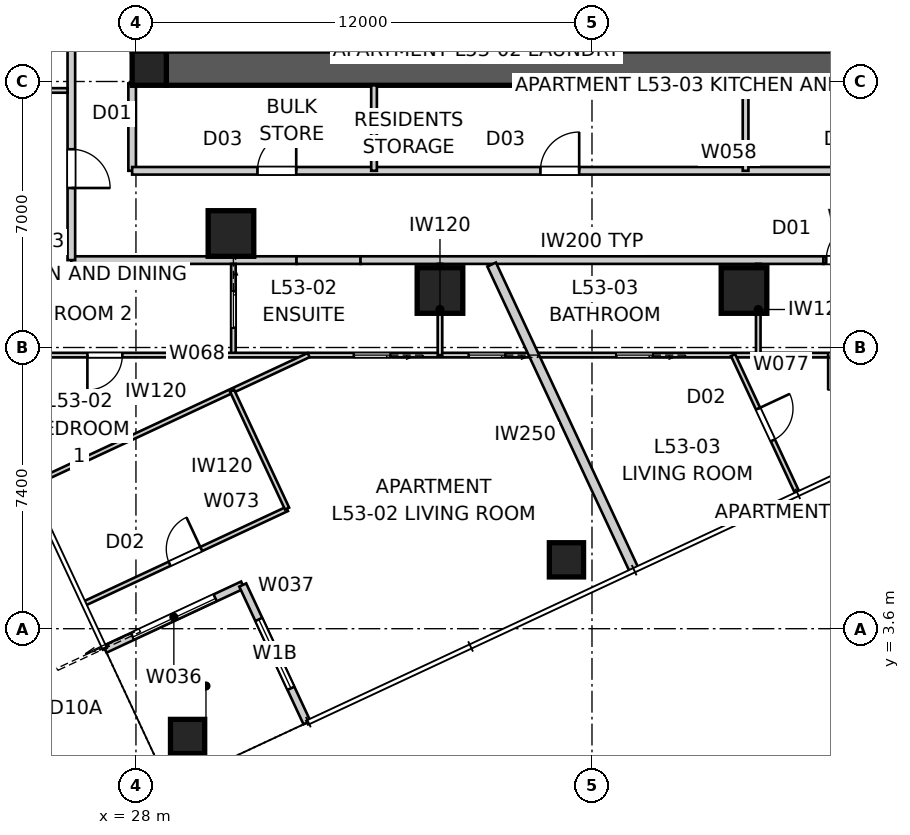
"""IFC4 building model, lengths in metres.
Left out: names, types, materials, properties, quantities, classifications, styles, units other than length and angle.
Written with IfcOpenShell. Run it as: python <this file> out.ifc"""

import sys

from ifc_helpers import new_model, si_unit, direction, frame, frame_2d, origin, origin_2d, place, context, subcontext, project, spatial, polyline, rectangle, outline, extrude, element, fill, save


model = new_model("IFC4")
c1 = context("Model", 3, precision=1e-05, world=origin(), true_north=direction((0.0, 1.0)))
c2 = subcontext(c1, "Body", "Model", "MODEL_VIEW")
j1 = project(units=[si_unit("LENGTHUNIT", "METRE"), si_unit("PLANEANGLEUNIT", "RADIAN")], contexts=[c1])
p1 = place(None, origin())
s1 = spatial("IfcSite", under=j1, at=p1, CompositionType="ELEMENT")
p2 = place(p1, origin())
s2 = spatial("IfcBuilding", under=s1, at=p2, CompositionType="ELEMENT")
p3 = place(p2, frame((0.0, 0.0, 193.0)))
s3 = spatial("IfcBuildingStorey", under=s2, at=p3, CompositionType="ELEMENT", Elevation=193.0)
p4 = place(p3, frame((51.2, 18.35, 0.0), z_axis=(0.0, 0.0, 1.0), x_axis=(-1.0, 0.0, 0.0)))
e1 = element("IfcWall", 1, at=p4, inside=s3, PredefinedType="SHEAR", context=c2, shape_type="SweptSolid", body=[
    extrude(outline(polyline([(0.0, -0.45), (22.4, -0.45), (22.4, -0.025), (22.85, -0.025), (22.85, 0.025), (22.4, 0.025), (22.4, 0.45), (0.0, 0.45), (0.0, 0.025), (-0.45, 0.025), (-0.45, -0.025), (0.0, -0.025), (0.0, -0.45)])), origin(), (0.0, 0.0, 1.0), 3.4),
])
p5 = place(p3, frame((28.35, 41.2, 0.0), z_axis=(0.0, 0.0, 1.0), x_axis=(0.0, -1.0, 0.0)))
e2 = element("IfcWall", 2, at=p5, inside=s3, PredefinedType="SHEAR", context=c2, shape_type="SweptSolid", body=[
    extrude(outline(polyline([(0.0, -0.45), (22.4, -0.45), (22.4, -0.025), (22.85, -0.025), (22.85, 0.025), (22.4, 0.025), (22.4, 0.45), (0.0, 0.45), (0.0, 0.025), (-0.45, 0.025), (-0.45, -0.025), (0.0, -0.025), (0.0, -0.45)])), origin(), (0.0, 0.0, 1.0), 3.4),
])
p6 = place(p5, frame((11.14, 0.0, 0.0)))
e3 = element("IfcOpeningElement", 3, at=p6, cuts=e2, PredefinedType="OPENING", context=c2, shape_type="SweptSolid", body=[
    extrude(rectangle(XDim=1.02, YDim=2.4, at=frame_2d((0.51, 1.2))), frame((0.0, 0.46, 0.0), z_axis=(0.0, -1.0, 0.0), x_axis=(1.0, 0.0, 0.0)), (0.0, 0.0, 1.0), 0.92),
])
for number, where, z_axis, x_axis in (
    (4, (28.35, 18.35, 0.0), (0.0, 0.0, 1.0), (1.0, 0.0, 0.0)),
    (5, (29.359, 0.764, 0.0), (0.0, 0.0, 1.0), (1.0, 0.0, 0.0)),
    (6, (39.328, 5.412, 0.0), (0.0, 0.0, 1.0), (1.0, 0.0, 0.0)),
):
    element("IfcColumn", number, at=place(p3, frame(where, z_axis=z_axis, x_axis=x_axis)), inside=s3, PredefinedType="COLUMN", context=c2, shape_type="SweptSolid", body=[
        extrude(rectangle(XDim=0.9, YDim=0.9, at=origin_2d()), origin(), (0.0, 0.0, 1.0), 3.4),
    ])
for number, where, z_axis, x_axis in (
    (7, (30.5, 14.0, 0.0), (0.0, 0.0, 1.0), (1.0, 0.0, 0.0)),
    (8, (36.0, 12.5, 0.0), (0.0, 0.0, 1.0), (1.0, 0.0, 0.0)),
    (9, (44.0, 12.5, 0.0), (0.0, 0.0, 1.0), (1.0, 0.0, 0.0)),
):
    element("IfcColumn", number, at=place(p3, frame(where, z_axis=z_axis, x_axis=x_axis)), inside=s3, PredefinedType="COLUMN", context=c2, shape_type="SweptSolid", body=[
        extrude(rectangle(XDim=1.2, YDim=1.2, at=origin_2d()), origin(), (0.0, 0.0, 1.0), 3.4),
    ])
p7 = place(p3, frame((27.185, 3.06, 0.0), z_axis=(0.0, 0.0, 1.0), x_axis=(0.906289140828, 0.422658246362, 0.0)))
e10 = element("IfcWall", 10, at=p7, inside=s3, PredefinedType="SOLIDWALL", context=c2, shape_type="SweptSolid", body=[
    extrude(rectangle(XDim=4.0, YDim=0.2, at=frame_2d((2.0, 0.0))), origin(), (0.0, 0.0, 1.0), 3.25),
])
p8 = place(p7, frame((0.8, 0.0, 0.0)))
e11 = element("IfcOpeningElement", 11, at=p8, cuts=e10, PredefinedType="OPENING", context=c2, shape_type="SweptSolid", body=[
    extrude(rectangle(XDim=2.4, YDim=2.1, at=frame_2d((1.2, 1.05))), frame((0.0, 0.11, 0.0), z_axis=(0.0, -1.0, 0.0), x_axis=(1.0, 0.0, 0.0)), (0.0, 0.0, 1.0), 0.22),
])
p9 = place(p3, frame((30.81, 4.75, 0.0), z_axis=(0.0, 0.0, 1.0), x_axis=(0.422658246362, -0.906289140828, 0.0)))
e12 = element("IfcWall", 12, at=p9, inside=s3, PredefinedType="SOLIDWALL", context=c2, shape_type="SweptSolid", body=[
    extrude(rectangle(XDim=4.0, YDim=0.2, at=frame_2d((2.0, 0.0))), origin(), (0.0, 0.0, 1.0), 3.25),
])
p10 = place(p9, frame((1.0, 0.0, 0.45)))
e13 = element("IfcOpeningElement", 13, at=p10, cuts=e12, PredefinedType="OPENING", context=c2, shape_type="SweptSolid", body=[
    extrude(rectangle(XDim=2.0, YDim=1.8, at=frame_2d((1.0, 0.9))), frame((0.0, 0.11, 0.0), z_axis=(0.0, -1.0, 0.0), x_axis=(1.0, 0.0, 0.0)), (0.0, 0.0, 1.0), 0.22),
])
p11 = place(p3, frame((26.3, 13.3, 0.0), z_axis=(0.0, 0.0, 1.0), x_axis=(1.0, 0.0, 0.0)))
e14 = element("IfcWall", 14, at=p11, inside=s3, PredefinedType="PARTITIONING", context=c2, shape_type="SweptSolid", body=[
    extrude(rectangle(XDim=5.925, YDim=0.2, at=frame_2d((2.962, 0.0))), origin(), (0.0, 0.0, 1.0), 3.25),
])
p12 = place(p3, frame((32.225, 13.3, 0.0), z_axis=(0.0, 0.0, 1.0), x_axis=(1.0, 0.0, 0.0)))
e15 = element("IfcWall", 15, at=p12, inside=s3, PredefinedType="PARTITIONING", context=c2, shape_type="SweptSolid", body=[
    extrude(rectangle(XDim=1.684, YDim=0.2, at=frame_2d((0.842, 0.0))), origin(), (0.0, 0.0, 1.0), 2.55),
])
p13 = place(p3, frame((33.908, 13.3, 0.0), z_axis=(0.0, 0.0, 1.0), x_axis=(1.0, 0.0, 0.0)))
e16 = element("IfcWall", 16, at=p13, inside=s3, PredefinedType="PARTITIONING", context=c2, shape_type="SweptSolid", body=[
    extrude(rectangle(XDim=12.183, YDim=0.2, at=frame_2d((6.092, 0.0))), origin(), (0.0, 0.0, 1.0), 3.25),
])
p14 = place(p3, frame((46.092, 13.3, 0.0), z_axis=(0.0, 0.0, 1.0), x_axis=(1.0, 0.0, 0.0)))
e17 = element("IfcWall", 17, at=p14, inside=s3, PredefinedType="PARTITIONING", context=c2, shape_type="SweptSolid", body=[
    extrude(rectangle(XDim=1.684, YDim=0.2, at=frame_2d((0.842, 0.0))), origin(), (0.0, 0.0, 1.0), 2.55),
])
p15 = place(p14, frame((0.073, 0.0, 0.0)))
e18 = element("IfcOpeningElement", 18, at=p15, cuts=e17, PredefinedType="OPENING", context=c2, shape_type="SweptSolid", body=[
    extrude(rectangle(XDim=1.02, YDim=2.34, at=frame_2d((0.51, 1.17))), frame((0.0, 0.11, 0.0), z_axis=(0.0, -1.0, 0.0), x_axis=(1.0, 0.0, 0.0)), (0.0, 0.0, 1.0), 0.22),
])
p16 = place(p3, frame((26.3, 47.1, 0.0), z_axis=(0.0, 0.0, 1.0), x_axis=(0.0, -1.0, 0.0)))
e19 = element("IfcWall", 19, at=p16, inside=s3, PredefinedType="PARTITIONING", context=c2, shape_type="SweptSolid", body=[
    extrude(rectangle(XDim=33.8, YDim=0.2, at=frame_2d((16.9, 0.0))), origin(), (0.0, 0.0, 1.0), 3.25),
])
p17 = place(p16, frame((15.449, 0.0, 0.0)))
e20 = element("IfcOpeningElement", 20, at=p17, cuts=e19, PredefinedType="OPENING", context=c2, shape_type="SweptSolid", body=[
    extrude(rectangle(XDim=1.02, YDim=2.34, at=frame_2d((0.51, 1.17))), frame((0.0, 0.11, 0.0), z_axis=(0.0, -1.0, 0.0), x_axis=(1.0, 0.0, 0.0)), (0.0, 0.0, 1.0), 0.22),
])
p18 = place(p16, frame((30.883, 0.0, 0.0)))
e21 = element("IfcOpeningElement", 21, at=p18, cuts=e19, PredefinedType="OPENING", context=c2, shape_type="SweptSolid", body=[
    extrude(rectangle(XDim=1.02, YDim=2.34, at=frame_2d((0.51, 1.17))), frame((0.0, 0.11, 0.0), z_axis=(0.0, -1.0, 0.0), x_axis=(1.0, 0.0, 0.0)), (0.0, 0.0, 1.0), 0.22),
])
p19 = place(p3, frame((41.11, 5.14, 0.0), z_axis=(0.0, 0.0, 1.0), x_axis=(-0.42262942879, 0.906302579672, 0.0)))
e22 = element("IfcWall", 22, at=p19, inside=s3, PredefinedType="PARTITIONING", context=c2, shape_type="SweptSolid", body=[
    extrude(rectangle(XDim=8.875, YDim=0.25, at=frame_2d((4.438, 0.0))), origin(), (0.0, 0.0, 1.0), 3.25),
])
p20 = place(p3, frame((27.9, 17.95, 0.0), z_axis=(0.0, 0.0, 1.0), x_axis=(0.0, -1.0, 0.0)))
e23 = element("IfcWall", 23, at=p20, inside=s3, PredefinedType="PARTITIONING", context=c2, shape_type="SweptSolid", body=[
    extrude(rectangle(XDim=2.3, YDim=0.2, at=frame_2d((1.15, 0.0))), origin(), (0.0, 0.0, 1.0), 3.25),
])
p21 = place(p3, frame((27.9, 15.65, 0.0), z_axis=(0.0, 0.0, 1.0), x_axis=(1.0, 0.0, 0.0)))
e24 = element("IfcWall", 24, at=p21, inside=s3, PredefinedType="PARTITIONING", context=c2, shape_type="SweptSolid", body=[
    extrude(rectangle(XDim=24.2, YDim=0.2, at=frame_2d((12.1, 0.0))), origin(), (0.0, 0.0, 1.0), 3.25),
])
p22 = place(p21, frame((10.743, 0.0, 0.0)))
e25 = element("IfcOpeningElement", 25, at=p22, cuts=e24, PredefinedType="OPENING", context=c2, shape_type="SweptSolid", body=[
    extrude(rectangle(XDim=1.02, YDim=2.1, at=frame_2d((0.51, 1.05))), frame((0.0, 0.11, 0.0), z_axis=(0.0, -1.0, 0.0), x_axis=(1.0, 0.0, 0.0)), (0.0, 0.0, 1.0), 0.22),
])
p23 = place(p21, frame((19.636, 0.0, 0.0)))
e26 = element("IfcOpeningElement", 26, at=p23, cuts=e24, PredefinedType="OPENING", context=c2, shape_type="SweptSolid", body=[
    extrude(rectangle(XDim=1.02, YDim=2.1, at=frame_2d((0.51, 1.05))), frame((0.0, 0.11, 0.0), z_axis=(0.0, -1.0, 0.0), x_axis=(1.0, 0.0, 0.0)), (0.0, 0.0, 1.0), 0.22),
])
p24 = place(p21, frame((3.297, 0.0, 0.0)))
e27 = element("IfcOpeningElement", 27, at=p24, cuts=e24, PredefinedType="OPENING", context=c2, shape_type="SweptSolid", body=[
    extrude(rectangle(XDim=1.02, YDim=2.1, at=frame_2d((0.51, 1.05))), frame((0.0, 0.11, 0.0), z_axis=(0.0, -1.0, 0.0), x_axis=(1.0, 0.0, 0.0)), (0.0, 0.0, 1.0), 0.22),
])
p25 = place(p3, frame((34.265, 15.65, 0.0), z_axis=(0.0, 0.0, 1.0), x_axis=(0.0, 1.0, 0.0)))
e28 = element("IfcWall", 28, at=p25, inside=s3, PredefinedType="SOLIDWALL", context=c2, shape_type="SweptSolid", body=[
    extrude(rectangle(XDim=2.25, YDim=0.15, at=frame_2d((1.125, 0.0))), origin(), (0.0, 0.0, 1.0), 2.796),
])
p26 = place(p3, frame((44.042, 15.65, 0.0), z_axis=(0.0, 0.0, 1.0), x_axis=(0.0, 1.0, 0.0)))
e29 = element("IfcWall", 29, at=p26, inside=s3, PredefinedType="SOLIDWALL", context=c2, shape_type="SweptSolid", body=[
    extrude(rectangle(XDim=2.25, YDim=0.15, at=frame_2d((1.125, 0.0))), origin(), (0.0, 0.0, 1.0), 3.25),
])
p27 = place(p3, frame((23.8, 17.765, 0.0), z_axis=(0.0, 0.0, 1.0), x_axis=(1.0, 0.0, 0.0)))
e30 = element("IfcWall", 30, at=p27, inside=s3, PredefinedType="PARTITIONING", context=c2, shape_type="SweptSolid", body=[
    extrude(rectangle(XDim=2.4, YDim=0.12, at=frame_2d((1.2, 0.0))), origin(), (0.0, 0.0, 1.0), 3.25),
])
p28 = place(p27, frame((0.72, 0.0, 0.0)))
e31 = element("IfcOpeningElement", 31, at=p28, cuts=e30, PredefinedType="OPENING", context=c2, shape_type="SweptSolid", body=[
    extrude(rectangle(XDim=0.96, YDim=2.1, at=frame_2d((0.48, 1.05))), frame((0.0, 0.07, 0.0), z_axis=(0.0, -1.0, 0.0), x_axis=(1.0, 0.0, 0.0)), (0.0, 0.0, 1.0), 0.14),
])
p29 = place(p3, frame((30.564, 13.2, 0.0), z_axis=(0.0, 0.0, 1.0), x_axis=(0.0, -1.0, 0.0)))
e32 = element("IfcWall", 32, at=p29, inside=s3, PredefinedType="PARTITIONING", context=c2, shape_type="SweptSolid", body=[
    extrude(rectangle(XDim=2.4, YDim=0.12, at=frame_2d((1.2, 0.0))), origin(), (0.0, 0.0, 1.0), 3.25),
])
p30 = place(p29, frame((0.72, 0.0, 0.0)))
e33 = element("IfcOpeningElement", 33, at=p30, cuts=e32, PredefinedType="OPENING", context=c2, shape_type="SweptSolid", body=[
    extrude(rectangle(XDim=0.96, YDim=2.1, at=frame_2d((0.48, 1.05))), frame((0.0, 0.07, 0.0), z_axis=(0.0, -1.0, 0.0), x_axis=(1.0, 0.0, 0.0)), (0.0, 0.0, 1.0), 0.14),
])
p31 = place(p3, frame((53.208, 10.8, 0.0), z_axis=(0.0, 0.0, 1.0), x_axis=(-1.0, 0.0, 0.0)))
e34 = element("IfcWall", 34, at=p31, inside=s3, PredefinedType="PARTITIONING", context=c2, shape_type="SweptSolid", body=[
    extrude(rectangle(XDim=29.593, YDim=0.12, at=frame_2d((14.796, 0.0))), origin(), (0.0, 0.0, 1.0), 3.25),
])
p32 = place(p31, frame((6.074, 0.0, 0.0)))
e35 = element("IfcOpeningElement", 35, at=p32, cuts=e34, PredefinedType="OPENING", context=c2, shape_type="SweptSolid", body=[
    extrude(rectangle(XDim=0.92, YDim=2.34, at=frame_2d((0.46, 1.17))), frame((0.0, 0.07, 0.0), z_axis=(0.0, -1.0, 0.0), x_axis=(1.0, 0.0, 0.0)), (0.0, 0.0, 1.0), 0.14),
])
p33 = place(p31, frame((25.566, 0.0, 0.0)))
e36 = element("IfcOpeningElement", 36, at=p33, cuts=e34, PredefinedType="OPENING", context=c2, shape_type="SweptSolid", body=[
    extrude(rectangle(XDim=0.92, YDim=2.34, at=frame_2d((0.46, 1.17))), frame((0.0, 0.07, 0.0), z_axis=(0.0, -1.0, 0.0), x_axis=(1.0, 0.0, 0.0)), (0.0, 0.0, 1.0), 0.14),
])
p34 = place(p31, frame((18.515, 0.0, 0.0)))
e37 = element("IfcOpeningElement", 37, at=p34, cuts=e34, PredefinedType="OPENING", context=c2, shape_type="SweptSolid", body=[
    extrude(rectangle(XDim=0.96, YDim=2.1, at=frame_2d((0.48, 1.05))), frame((0.0, 0.07, 0.0), z_axis=(0.0, -1.0, 0.0), x_axis=(1.0, 0.0, 0.0)), (0.0, 0.0, 1.0), 0.14),
])
p35 = place(p31, frame((15.493, 0.0, 0.0)))
e38 = element("IfcOpeningElement", 38, at=p35, cuts=e34, PredefinedType="OPENING", context=c2, shape_type="SweptSolid", body=[
    extrude(rectangle(XDim=0.96, YDim=2.1, at=frame_2d((0.48, 1.05))), frame((0.0, 0.07, 0.0), z_axis=(0.0, -1.0, 0.0), x_axis=(1.0, 0.0, 0.0)), (0.0, 0.0, 1.0), 0.14),
])
p36 = place(p31, frame((11.609, 0.0, 0.0)))
e39 = element("IfcOpeningElement", 39, at=p36, cuts=e34, PredefinedType="OPENING", context=c2, shape_type="SweptSolid", body=[
    extrude(rectangle(XDim=0.96, YDim=2.1, at=frame_2d((0.48, 1.05))), frame((0.0, 0.07, 0.0), z_axis=(0.0, -1.0, 0.0), x_axis=(1.0, 0.0, 0.0)), (0.0, 0.0, 1.0), 0.14),
])
p37 = place(p3, frame((36.0, 13.2, 0.0), z_axis=(0.0, 0.0, 1.0), x_axis=(0.0, -1.0, 0.0)))
e40 = element("IfcWall", 40, at=p37, inside=s3, PredefinedType="PARTITIONING", context=c2, shape_type="SweptSolid", body=[
    extrude(rectangle(XDim=2.4, YDim=0.12, at=frame_2d((1.2, 0.0))), origin(), (0.0, 0.0, 1.0), 3.25),
])
p38 = place(p3, frame((25.213, 7.382, 0.0), z_axis=(0.0, 0.0, 1.0), x_axis=(0.906311876708, 0.422609491301, 0.0)))
e41 = element("IfcWall", 41, at=p38, inside=s3, PredefinedType="PARTITIONING", context=c2, shape_type="SweptSolid", body=[
    extrude(rectangle(XDim=8.088, YDim=0.12, at=frame_2d((4.044, 0.0))), origin(), (0.0, 0.0, 1.0), 3.25),
])
p39 = place(p3, frame((26.663, 4.273, 0.0), z_axis=(0.0, 0.0, 1.0), x_axis=(0.906259747144, 0.42272126834, 0.0)))
e42 = element("IfcWall", 42, at=p39, inside=s3, PredefinedType="PARTITIONING", context=c2, shape_type="SweptSolid", body=[
    extrude(rectangle(XDim=5.861, YDim=0.12, at=frame_2d((2.93, 0.0))), origin(), (0.0, 0.0, 1.0), 3.25),
])
p40 = place(p39, frame((2.45, 0.0, 0.0)))
e43 = element("IfcOpeningElement", 43, at=p40, cuts=e42, PredefinedType="OPENING", context=c2, shape_type="SweptSolid", body=[
    extrude(rectangle(XDim=0.92, YDim=2.34, at=frame_2d((0.46, 1.17))), frame((0.0, 0.07, 0.0), z_axis=(0.0, -1.0, 0.0), x_axis=(1.0, 0.0, 0.0)), (0.0, 0.0, 1.0), 0.14),
])
p41 = place(p3, frame((31.976, 6.761, 0.0), z_axis=(0.0, 0.0, 1.0), x_axis=(-0.422608022988, 0.906312561375, 0.0)))
e44 = element("IfcWall", 44, at=p41, inside=s3, PredefinedType="PARTITIONING", context=c2, shape_type="SweptSolid", body=[
    extrude(rectangle(XDim=3.421, YDim=0.12, at=frame_2d((1.71, 0.0))), origin(), (0.0, 0.0, 1.0), 3.25),
])
p42 = place(p3, frame((44.375, 10.8, 0.0), z_axis=(0.0, 0.0, 1.0), x_axis=(0.0, 1.0, 0.0)))
e45 = element("IfcWall", 45, at=p42, inside=s3, PredefinedType="PARTITIONING", context=c2, shape_type="SweptSolid", body=[
    extrude(rectangle(XDim=2.4, YDim=0.12, at=frame_2d((1.2, 0.0))), origin(), (0.0, 0.0, 1.0), 3.25),
])
p43 = place(p3, frame((43.712, 10.8, 0.0), z_axis=(0.0, 0.0, 1.0), x_axis=(0.422620823304, -0.906306592556, 0.0)))
e46 = element("IfcWall", 46, at=p43, inside=s3, PredefinedType="PARTITIONING", context=c2, shape_type="SweptSolid", body=[
    extrude(rectangle(XDim=3.99, YDim=0.12, at=frame_2d((1.995, 0.0))), origin(), (0.0, 0.0, 1.0), 3.25),
])
p44 = place(p43, frame((1.555, 0.0, 0.0)))
e47 = element("IfcOpeningElement", 47, at=p44, cuts=e46, PredefinedType="OPENING", context=c2, shape_type="SweptSolid", body=[
    extrude(rectangle(XDim=0.92, YDim=2.34, at=frame_2d((0.46, 1.17))), frame((0.0, 0.07, 0.0), z_axis=(0.0, -1.0, 0.0), x_axis=(1.0, 0.0, 0.0)), (0.0, 0.0, 1.0), 0.14),
])
p45 = place(p8, origin())
e48 = element("IfcDoor", 48, at=p45, inside=s3, OperationType="SLIDING_TO_LEFT", PredefinedType="DOOR", context=c2, shape_type="SweptSolid", body=[
    extrude(rectangle(XDim=2.4, YDim=2.1, at=frame_2d((1.2, 1.05))), frame((0.0, 0.025, 0.0), z_axis=(0.0, -1.0, 0.0), x_axis=(1.0, 0.0, 0.0)), (0.0, 0.0, 1.0), 0.05),
])
fill(e11, e48)
p46 = place(p10, origin())
e49 = element("IfcWindow", 49, at=p46, inside=s3, PartitioningType="SINGLE_PANEL", PredefinedType="WINDOW", context=c2, shape_type="SweptSolid", body=[
    extrude(rectangle(XDim=2.0, YDim=1.8, at=frame_2d((1.0, 0.9))), frame((0.0, 0.03, 0.0), z_axis=(0.0, -1.0, 0.0), x_axis=(1.0, 0.0, 0.0)), (0.0, 0.0, 1.0), 0.06),
])
fill(e13, e49)
p47 = place(p22, origin())
e50 = element("IfcDoor", 50, at=p47, inside=s3, OperationType="SINGLE_SWING_RIGHT", PredefinedType="DOOR", context=c2, shape_type="SweptSolid", body=[
    extrude(rectangle(XDim=1.02, YDim=2.1, at=frame_2d((0.51, 1.05))), frame((0.0, 0.025, 0.0), z_axis=(0.0, -1.0, 0.0), x_axis=(1.0, 0.0, 0.0)), (0.0, 0.0, 1.0), 0.05),
])
fill(e25, e50)
p48 = place(p24, origin())
e51 = element("IfcDoor", 51, at=p48, inside=s3, OperationType="SINGLE_SWING_RIGHT", PredefinedType="DOOR", context=c2, shape_type="SweptSolid", body=[
    extrude(rectangle(XDim=1.02, YDim=2.1, at=frame_2d((0.51, 1.05))), frame((0.0, 0.025, 0.0), z_axis=(0.0, -1.0, 0.0), x_axis=(1.0, 0.0, 0.0)), (0.0, 0.0, 1.0), 0.05),
])
fill(e27, e51)
p49 = place(p15, origin())
e52 = element("IfcDoor", 52, at=p49, inside=s3, OperationType="SINGLE_SWING_RIGHT", PredefinedType="DOOR", context=c2, shape_type="SweptSolid", body=[
    extrude(rectangle(XDim=1.02, YDim=2.34, at=frame_2d((0.51, 1.17))), frame((0.0, 0.025, 0.0), z_axis=(0.0, -1.0, 0.0), x_axis=(1.0, 0.0, 0.0)), (0.0, 0.0, 1.0), 0.05),
])
fill(e18, e52)
p50 = place(p18, origin())
e53 = element("IfcDoor", 53, at=p50, inside=s3, OperationType="SINGLE_SWING_RIGHT", PredefinedType="DOOR", context=c2, shape_type="SweptSolid", body=[
    extrude(rectangle(XDim=1.02, YDim=2.34, at=frame_2d((0.51, 1.17))), frame((0.0, 0.025, 0.0), z_axis=(0.0, -1.0, 0.0), x_axis=(1.0, 0.0, 0.0)), (0.0, 0.0, 1.0), 0.05),
])
fill(e21, e53)
p51 = place(p32, origin())
e54 = element("IfcDoor", 54, at=p51, inside=s3, OperationType="SINGLE_SWING_RIGHT", PredefinedType="DOOR", context=c2, shape_type="SweptSolid", body=[
    extrude(rectangle(XDim=0.92, YDim=2.34, at=frame_2d((0.46, 1.17))), frame((0.0, 0.025, 0.0), z_axis=(0.0, -1.0, 0.0), x_axis=(1.0, 0.0, 0.0)), (0.0, 0.0, 1.0), 0.05),
])
fill(e35, e54)
p52 = place(p33, origin())
e55 = element("IfcDoor", 55, at=p52, inside=s3, OperationType="SINGLE_SWING_RIGHT", PredefinedType="DOOR", context=c2, shape_type="SweptSolid", body=[
    extrude(rectangle(XDim=0.92, YDim=2.34, at=frame_2d((0.46, 1.17))), frame((0.0, 0.025, 0.0), z_axis=(0.0, -1.0, 0.0), x_axis=(1.0, 0.0, 0.0)), (0.0, 0.0, 1.0), 0.05),
])
fill(e36, e55)
p53 = place(p30, origin())
e56 = element("IfcDoor", 56, at=p53, inside=s3, OperationType="SLIDING_TO_LEFT", PredefinedType="DOOR", context=c2, shape_type="SweptSolid", body=[
    extrude(rectangle(XDim=0.96, YDim=2.1, at=frame_2d((0.48, 1.05))), frame((0.0, 0.025, 0.0), z_axis=(0.0, -1.0, 0.0), x_axis=(1.0, 0.0, 0.0)), (0.0, 0.0, 1.0), 0.05),
])
fill(e33, e56)
p54 = place(p34, origin())
e57 = element("IfcDoor", 57, at=p54, inside=s3, OperationType="SLIDING_TO_LEFT", PredefinedType="DOOR", context=c2, shape_type="SweptSolid", body=[
    extrude(rectangle(XDim=0.96, YDim=2.1, at=frame_2d((0.48, 1.05))), frame((0.0, 0.025, 0.0), z_axis=(0.0, -1.0, 0.0), x_axis=(1.0, 0.0, 0.0)), (0.0, 0.0, 1.0), 0.05),
])
fill(e37, e57)
p55 = place(p40, origin())
e58 = element("IfcDoor", 58, at=p55, inside=s3, OperationType="SINGLE_SWING_RIGHT", PredefinedType="DOOR", context=c2, shape_type="SweptSolid", body=[
    extrude(rectangle(XDim=0.92, YDim=2.34, at=frame_2d((0.46, 1.17))), frame((0.0, 0.025, 0.0), z_axis=(0.0, -1.0, 0.0), x_axis=(1.0, 0.0, 0.0)), (0.0, 0.0, 1.0), 0.05),
])
fill(e43, e58)
p56 = place(p35, origin())
e59 = element("IfcDoor", 59, at=p56, inside=s3, OperationType="SLIDING_TO_LEFT", PredefinedType="DOOR", context=c2, shape_type="SweptSolid", body=[
    extrude(rectangle(XDim=0.96, YDim=2.1, at=frame_2d((0.48, 1.05))), frame((0.0, 0.025, 0.0), z_axis=(0.0, -1.0, 0.0), x_axis=(1.0, 0.0, 0.0)), (0.0, 0.0, 1.0), 0.05),
])
fill(e38, e59)
p57 = place(p44, origin())
e60 = element("IfcDoor", 60, at=p57, inside=s3, OperationType="SINGLE_SWING_LEFT", PredefinedType="DOOR", context=c2, shape_type="SweptSolid", body=[
    extrude(rectangle(XDim=0.92, YDim=2.34, at=frame_2d((0.46, 1.17))), frame((0.0, 0.025, 0.0), z_axis=(0.0, -1.0, 0.0), x_axis=(1.0, 0.0, 0.0)), (0.0, 0.0, 1.0), 0.05),
])
fill(e47, e60)
p58 = place(p36, origin())
e61 = element("IfcDoor", 61, at=p58, inside=s3, OperationType="SLIDING_TO_LEFT", PredefinedType="DOOR", context=c2, shape_type="SweptSolid", body=[
    extrude(rectangle(XDim=0.96, YDim=2.1, at=frame_2d((0.48, 1.05))), frame((0.0, 0.025, 0.0), z_axis=(0.0, -1.0, 0.0), x_axis=(1.0, 0.0, 0.0)), (0.0, 0.0, 1.0), 0.05),
])
fill(e39, e61)
save(model, sys.argv[1])
